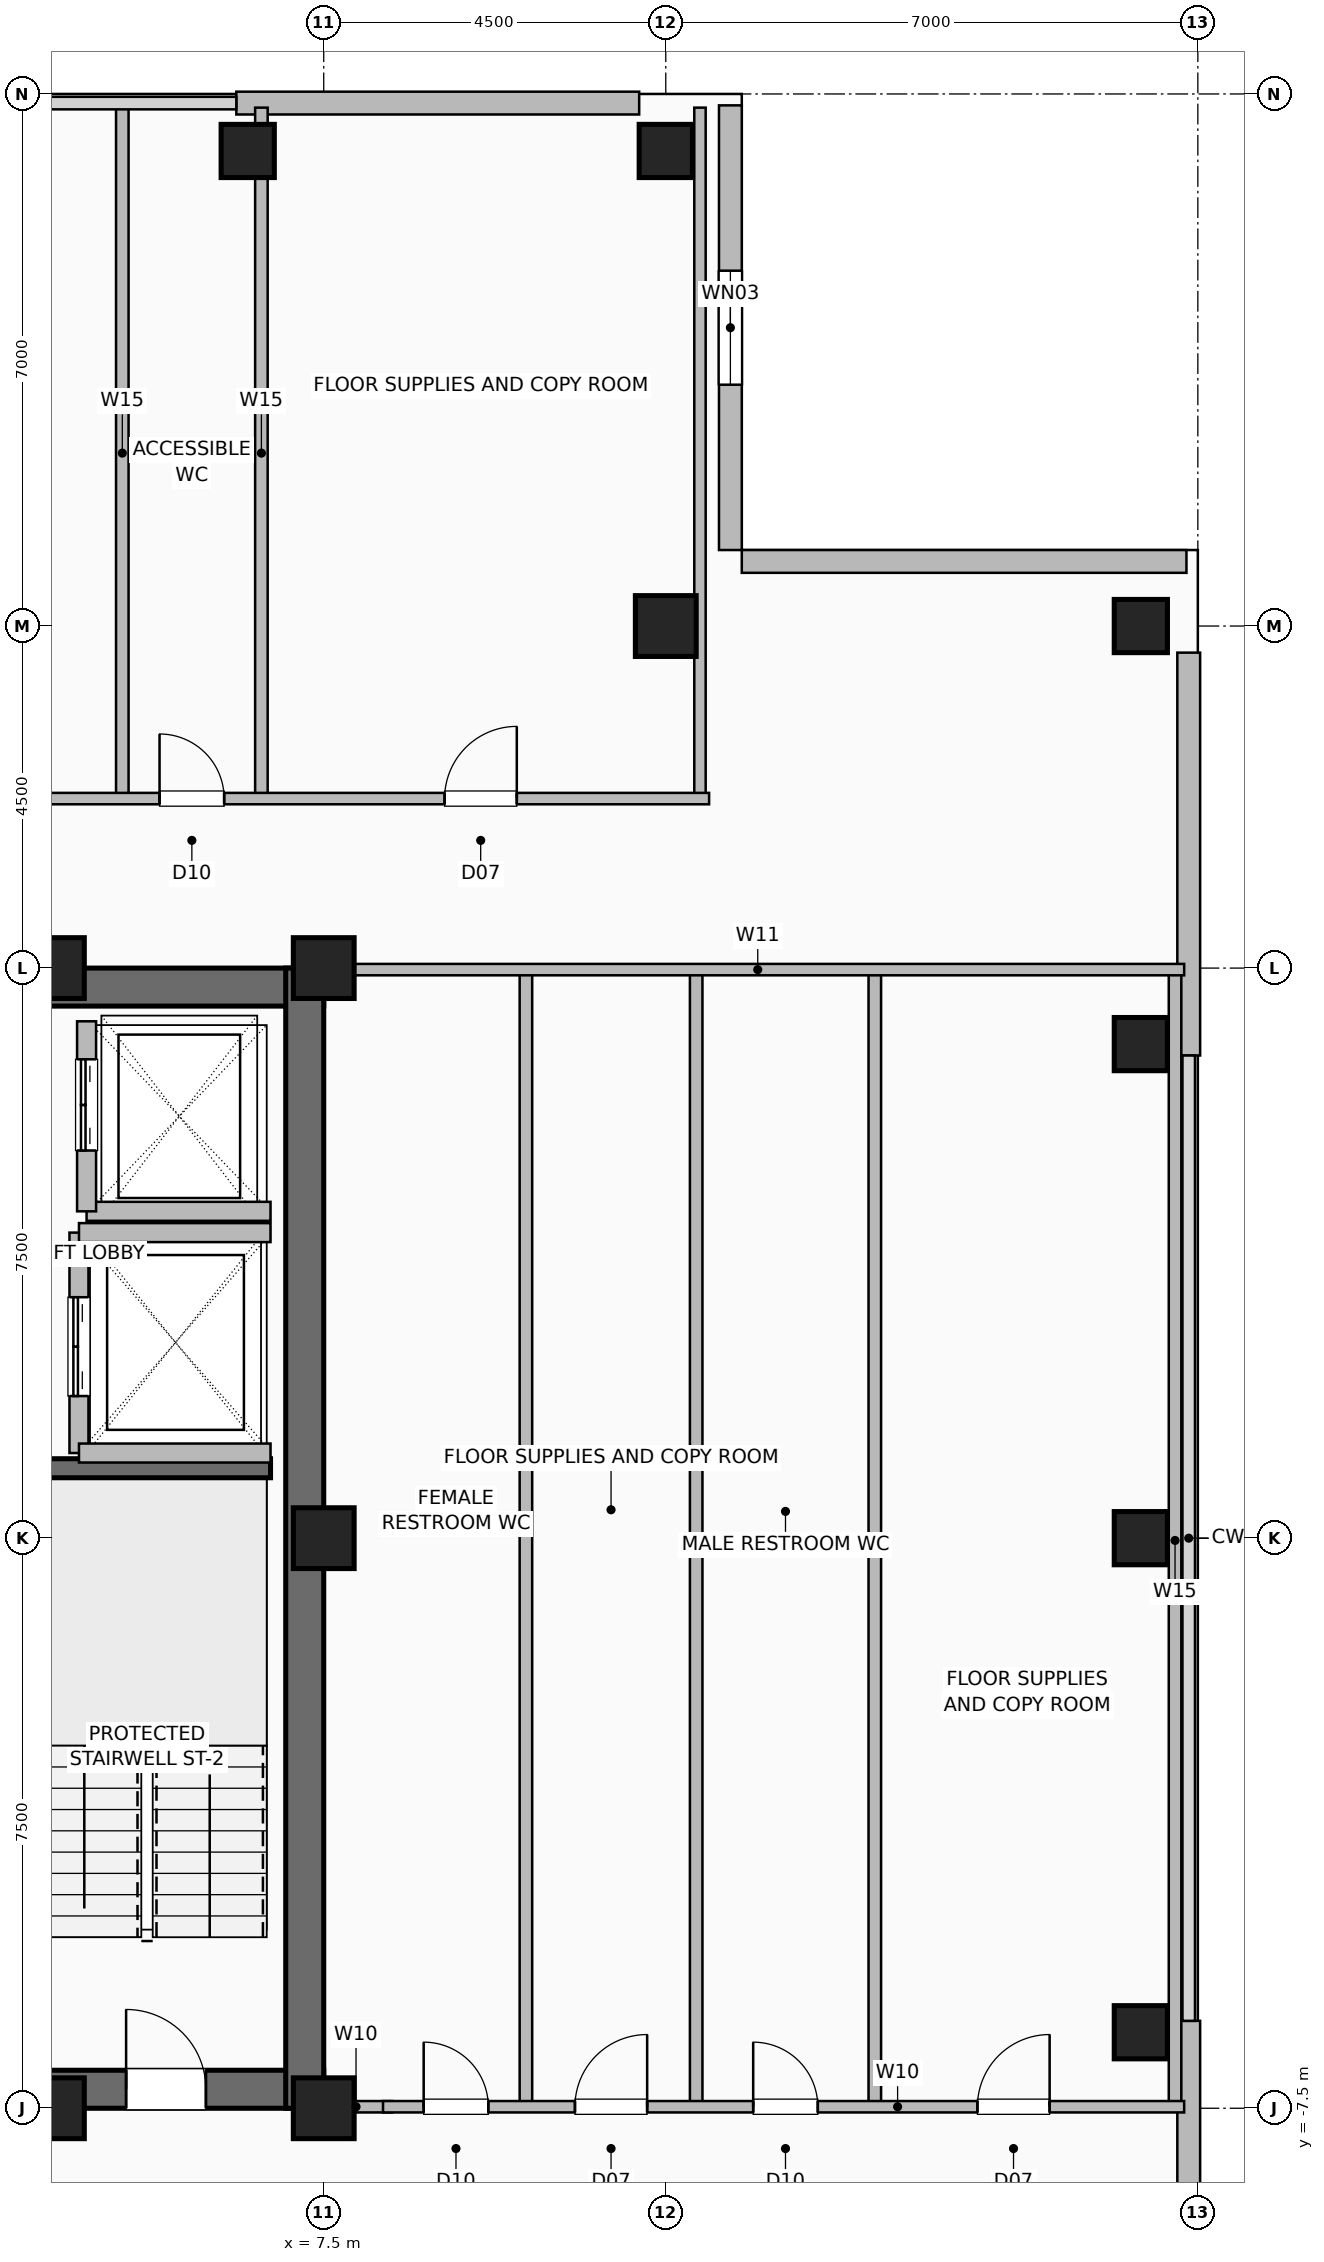
"""IFC4 building model, lengths in metres.
Left out: names, types, materials, properties, quantities, classifications, styles, units other than length and angle.
Written with IfcOpenShell. Run it as: python <this file> out.ifc"""

import sys

from ifc_helpers import new_model, si_unit, direction, frame, frame_2d, origin, origin_2d, place, context, subcontext, project, spatial, rectangle, hollow_rectangle, extrude, element, fill, save


model = new_model("IFC4")
c1 = context("Model", 3, precision=1e-05, world=origin(), true_north=direction((0.0, 1.0)))
c2 = subcontext(c1, "Body", "Model", "MODEL_VIEW")
j1 = project(units=[si_unit("LENGTHUNIT", "METRE"), si_unit("PLANEANGLEUNIT", "RADIAN")], contexts=[c1])
p1 = place(None, origin())
s1 = spatial("IfcSite", under=j1, at=p1, CompositionType="ELEMENT")
p2 = place(p1, origin())
s2 = spatial("IfcBuilding", under=s1, at=p2, CompositionType="ELEMENT")
p3 = place(p2, frame((0.0, 0.0, 257.6)))
s3 = spatial("IfcBuildingStorey", under=s2, at=p3, CompositionType="ELEMENT", Elevation=257.6)
for number, where, z_axis, x_axis in (
    (1, (3.95, -7.5, 0.0), (0.0, 0.0, 1.0), (1.0, 0.0, 0.0)),
    (2, (7.5, -7.5, 0.0), (0.0, 0.0, 1.0), (1.0, 0.0, 0.0)),
    (3, (7.5, 0.0, 0.0), (0.0, 0.0, 1.0), (1.0, 0.0, 0.0)),
    (4, (7.5, 7.5, 0.0), (0.0, 0.0, 1.0), (1.0, 0.0, 0.0)),
    (5, (3.95, 7.5, 0.0), (0.0, 0.0, 1.0), (1.0, 0.0, 0.0)),
):
    element("IfcColumn", number, at=place(p3, frame(where, z_axis=z_axis, x_axis=x_axis)), inside=s3, PredefinedType="COLUMN", context=c2, shape_type="SweptSolid", body=[
        extrude(hollow_rectangle(XDim=0.8, YDim=0.8, WallThickness=0.04, at=origin_2d()), origin(), (0.0, 0.0, 1.0), 3.6),
    ])
for number, where, z_axis, x_axis in (
    (6, (18.25, -6.5, 0.0), (0.0, 0.0, 1.0), (1.0, 0.0, 0.0)),
    (7, (18.25, 0.0, 0.0), (0.0, 0.0, 1.0), (1.0, 0.0, 0.0)),
    (8, (6.5, 18.25, 0.0), (0.0, 0.0, 1.0), (1.0, 0.0, 0.0)),
    (9, (18.25, 6.5, 0.0), (0.0, 0.0, 1.0), (1.0, 0.0, 0.0)),
    (10, (12.0, 18.25, 0.0), (0.0, 0.0, 1.0), (1.0, 0.0, 0.0)),
    (11, (18.25, 12.0, 0.0), (0.0, 0.0, 1.0), (1.0, 0.0, 0.0)),
):
    element("IfcColumn", number, at=place(p3, frame(where, z_axis=z_axis, x_axis=x_axis)), inside=s3, PredefinedType="COLUMN", context=c2, shape_type="SweptSolid", body=[
        extrude(hollow_rectangle(XDim=0.7, YDim=0.7, WallThickness=0.035, at=origin_2d()), origin(), (0.0, 0.0, 1.0), 3.6),
    ])
p4 = place(p3, frame((12.0, 12.0, 0.0), z_axis=(0.0, 0.0, 1.0), x_axis=(1.0, 0.0, 0.0)))
e12 = element("IfcColumn", 12, at=p4, inside=s3, PredefinedType="COLUMN", context=c2, shape_type="SweptSolid", body=[
    extrude(hollow_rectangle(XDim=0.8, YDim=0.8, WallThickness=0.04, at=origin_2d()), origin(), (0.0, 0.0, 1.0), 3.6),
])
for number, where, z_axis, x_axis in (
    (13, (6.35, 18.88, 0.0), (0.0, 0.0, 1.0), (1.0, 0.0, 0.0)),
    (14, (18.88, -11.65, 0.0), (0.0, 0.0, 1.0), (0.0, 1.0, 0.0)),
    (15, (18.88, 6.35, 0.0), (0.0, 0.0, 1.0), (0.0, 1.0, 0.0)),
):
    element("IfcWall", number, at=place(p3, frame(where, z_axis=z_axis, x_axis=x_axis)), inside=s3, PredefinedType="SOLIDWALL", context=c2, shape_type="SweptSolid", body=[
        extrude(rectangle(XDim=5.3, YDim=0.3, at=frame_2d((2.65, 0.0))), origin(), (0.0, 0.0, 1.0), 3.36),
    ])
p5 = place(p3, frame((12.85, 18.85, 0.0), z_axis=(0.0, 0.0, 1.0), x_axis=(0.0, -1.0, 0.0)))
e16 = element("IfcWall", 16, at=p5, inside=s3, PredefinedType="SOLIDWALL", context=c2, shape_type="SweptSolid", body=[
    extrude(rectangle(XDim=5.85, YDim=0.3, at=frame_2d((2.925, 0.0))), origin(), (0.0, 0.0, 1.0), 3.36),
])
p6 = place(p5, frame((2.175, 0.0, 0.9)))
e17 = element("IfcOpeningElement", 17, at=p6, cuts=e16, PredefinedType="OPENING", context=c2, shape_type="SweptSolid", body=[
    extrude(rectangle(XDim=1.5, YDim=1.8, at=frame_2d((0.75, 0.9))), frame((0.0, 0.16, 0.0), z_axis=(0.0, -1.0, 0.0), x_axis=(1.0, 0.0, 0.0)), (0.0, 0.0, 1.0), 0.32),
])
p7 = place(p3, frame((18.85, 12.85, 0.0), z_axis=(0.0, 0.0, 1.0), x_axis=(-1.0, 0.0, 0.0)))
e18 = element("IfcWall", 18, at=p7, inside=s3, PredefinedType="SOLIDWALL", context=c2, shape_type="SweptSolid", body=[
    extrude(rectangle(XDim=5.85, YDim=0.3, at=frame_2d((2.925, 0.0))), origin(), (0.0, 0.0, 1.0), 3.36),
])
p8 = place(p3, frame((-7.5, -7.25, 0.0), z_axis=(0.0, 0.0, 1.0), x_axis=(1.0, 0.0, 0.0)))
e19 = element("IfcWall", 19, at=p8, inside=s3, PredefinedType="SHEAR", context=c2, shape_type="SweptSolid", body=[
    extrude(rectangle(XDim=15.0, YDim=0.5, at=frame_2d((7.5, 0.0))), origin(), (0.0, 0.0, 1.0), 3.36),
])
p9 = place(p8, frame((1.55, 0.0, 0.0)))
e20 = element("IfcOpeningElement", 20, at=p9, cuts=e19, PredefinedType="OPENING", context=c2, shape_type="SweptSolid", body=[
    extrude(rectangle(XDim=1.05, YDim=2.08, at=frame_2d((0.525, 1.04))), frame((0.0, 0.26, 0.0), z_axis=(0.0, -1.0, 0.0), x_axis=(1.0, 0.0, 0.0)), (0.0, 0.0, 1.0), 0.52),
])
p10 = place(p8, frame((12.4, 0.0, 0.0)))
e21 = element("IfcOpeningElement", 21, at=p10, cuts=e19, PredefinedType="OPENING", context=c2, shape_type="SweptSolid", body=[
    extrude(rectangle(XDim=1.05, YDim=2.08, at=frame_2d((0.525, 1.04))), frame((0.0, 0.26, 0.0), z_axis=(0.0, -1.0, 0.0), x_axis=(1.0, 0.0, 0.0)), (0.0, 0.0, 1.0), 0.52),
])
p11 = place(p8, frame((5.2, 0.0, 0.0)))
e22 = element("IfcOpeningElement", 22, at=p11, cuts=e19, PredefinedType="OPENING", context=c2, shape_type="SweptSolid", body=[
    extrude(rectangle(XDim=1.0, YDim=2.08, at=frame_2d((0.5, 1.04))), frame((0.0, 0.26, 0.0), z_axis=(0.0, -1.0, 0.0), x_axis=(1.0, 0.0, 0.0)), (0.0, 0.0, 1.0), 0.52),
])
p12 = place(p8, frame((8.65, 0.0, 0.0)))
e23 = element("IfcOpeningElement", 23, at=p12, cuts=e19, PredefinedType="OPENING", context=c2, shape_type="SweptSolid", body=[
    extrude(rectangle(XDim=1.0, YDim=2.08, at=frame_2d((0.5, 1.04))), frame((0.0, 0.26, 0.0), z_axis=(0.0, -1.0, 0.0), x_axis=(1.0, 0.0, 0.0)), (0.0, 0.0, 1.0), 0.52),
])
for number, where, z_axis, x_axis in (
    (24, (-7.5, 7.25, 0.0), (0.0, 0.0, 1.0), (1.0, 0.0, 0.0)),
    (25, (7.25, -7.5, 0.0), (0.0, 0.0, 1.0), (0.0, 1.0, 0.0)),
):
    element("IfcWall", number, at=place(p3, frame(where, z_axis=z_axis, x_axis=x_axis)), inside=s3, PredefinedType="SHEAR", context=c2, shape_type="SweptSolid", body=[
        extrude(rectangle(XDim=15.0, YDim=0.5, at=frame_2d((7.5, 0.0))), origin(), (0.0, 0.0, 1.0), 3.36),
    ])
p13 = place(p3, frame((3.47, 0.92, 0.0), z_axis=(0.0, 0.0, 1.0), x_axis=(1.0, 0.0, 0.0)))
e26 = element("IfcWall", 26, at=p13, inside=s3, PredefinedType="SHEAR", context=c2, shape_type="SweptSolid", body=[
    extrude(rectangle(XDim=3.33, YDim=0.25, at=frame_2d((1.665, 0.0))), origin(), (0.0, 0.0, 1.0), 3.36),
])
p14 = place(p3, frame((4.38, 4.3, 0.0), z_axis=(0.0, 0.0, 1.0), x_axis=(1.0, 0.0, 0.0)))
e27 = element("IfcWall", 27, at=p14, inside=s3, PredefinedType="SHEAR", context=c2, shape_type="SweptSolid", body=[
    extrude(rectangle(XDim=2.42, YDim=0.25, at=frame_2d((1.21, 0.0))), origin(), (0.0, 0.0, 1.0), 3.36),
])
p15 = place(p3, frame((4.38, 4.3, 0.0), z_axis=(0.0, 0.0, 1.0), x_axis=(0.0, 1.0, 0.0)))
e28 = element("IfcWall", 28, at=p15, inside=s3, PredefinedType="SHEAR", context=c2, shape_type="SweptSolid", body=[
    extrude(rectangle(XDim=2.5, YDim=0.25, at=frame_2d((1.25, 0.0))), origin(), (0.0, 0.0, 1.0), 3.36),
])
p16 = place(p15, frame((0.8, 0.0, 0.0)))
e29 = element("IfcOpeningElement", 29, at=p16, cuts=e28, PredefinedType="OPENING", context=c2, shape_type="SweptSolid", body=[
    extrude(rectangle(XDim=1.2, YDim=2.2, at=frame_2d((0.6, 1.1))), frame((0.0, 0.135, 0.0), z_axis=(0.0, -1.0, 0.0), x_axis=(1.0, 0.0, 0.0)), (0.0, 0.0, 1.0), 0.27),
])
p17 = place(p3, frame((4.28, 1.12, 0.0), z_axis=(0.0, 0.0, 1.0), x_axis=(0.0, 1.0, 0.0)))
e30 = element("IfcWall", 30, at=p17, inside=s3, PredefinedType="SHEAR", context=c2, shape_type="SweptSolid", body=[
    extrude(rectangle(XDim=2.9, YDim=0.25, at=frame_2d((1.45, 0.0))), origin(), (0.0, 0.0, 1.0), 3.36),
])
p18 = place(p17, frame((0.75, 0.0, 0.0)))
e31 = element("IfcOpeningElement", 31, at=p18, cuts=e30, PredefinedType="OPENING", context=c2, shape_type="SweptSolid", body=[
    extrude(rectangle(XDim=1.3, YDim=2.3, at=frame_2d((0.65, 1.15))), frame((0.0, 0.135, 0.0), z_axis=(0.0, -1.0, 0.0), x_axis=(1.0, 0.0, 0.0)), (0.0, 0.0, 1.0), 0.27),
])
for number, where, z_axis, x_axis in (
    (32, (4.28, 1.12, 0.0), (0.0, 0.0, 1.0), (1.0, 0.0, 0.0)),
    (33, (4.28, 4.02, 0.0), (0.0, 0.0, 1.0), (1.0, 0.0, 0.0)),
):
    element("IfcWall", number, at=place(p3, frame(where, z_axis=z_axis, x_axis=x_axis)), inside=s3, PredefinedType="SHEAR", context=c2, shape_type="SweptSolid", body=[
        extrude(rectangle(XDim=2.52, YDim=0.25, at=frame_2d((1.26, 0.0))), origin(), (0.0, 0.0, 1.0), 3.36),
    ])
for number, where, z_axis, x_axis in (
    (34, (6.68, 9.73, 0.0), (0.0, 0.0, 1.0), (0.0, 1.0, 0.0)),
    (35, (4.85, 9.73, 0.0), (0.0, 0.0, 1.0), (0.0, 1.0, 0.0)),
):
    element("IfcWall", number, at=place(p3, frame(where, z_axis=z_axis, x_axis=x_axis)), inside=s3, PredefinedType="PLUMBINGWALL", context=c2, shape_type="SweptSolid", body=[
        extrude(rectangle(XDim=9.09, YDim=0.165, at=frame_2d((4.545, 0.0))), origin(), (0.0, 0.0, 1.0), 3.36),
    ])
p19 = place(p3, frame((12.45, 9.73, 0.0), z_axis=(0.0, 0.0, 1.0), x_axis=(0.0, 1.0, 0.0)))
e36 = element("IfcWall", 36, at=p19, inside=s3, PredefinedType="PARTITIONING", context=c2, shape_type="SweptSolid", body=[
    extrude(rectangle(XDim=9.09, YDim=0.15, at=frame_2d((4.545, 0.0))), origin(), (0.0, 0.0, 1.0), 3.36),
])
p20 = place(p3, frame((-7.52, 9.73, 0.0), z_axis=(0.0, 0.0, 1.0), x_axis=(1.0, 0.0, 0.0)))
e37 = element("IfcWall", 37, at=p20, inside=s3, PredefinedType="PARTITIONING", context=c2, shape_type="SweptSolid", body=[
    extrude(rectangle(XDim=20.09, YDim=0.15, at=frame_2d((10.045, 0.0))), origin(), (0.0, 0.0, 1.0), 3.36),
])
p21 = place(p20, frame((5.345, 0.0, 0.0)))
e38 = element("IfcOpeningElement", 38, at=p21, cuts=e37, PredefinedType="OPENING", context=c2, shape_type="SweptSolid", body=[
    extrude(rectangle(XDim=1.8, YDim=2.08, at=frame_2d((0.9, 1.04))), frame((0.0, 0.085, 0.0), z_axis=(0.0, -1.0, 0.0), x_axis=(1.0, 0.0, 0.0)), (0.0, 0.0, 1.0), 0.17),
])
p22 = place(p20, frame((12.86, 0.0, 0.0)))
e39 = element("IfcOpeningElement", 39, at=p22, cuts=e37, PredefinedType="OPENING", context=c2, shape_type="SweptSolid", body=[
    extrude(rectangle(XDim=0.85, YDim=2.05, at=frame_2d((0.425, 1.025))), frame((0.0, 0.085, 0.0), z_axis=(0.0, -1.0, 0.0), x_axis=(1.0, 0.0, 0.0)), (0.0, 0.0, 1.0), 0.17),
])
p23 = place(p20, frame((16.61, 0.0, 0.0)))
e40 = element("IfcOpeningElement", 40, at=p23, cuts=e37, PredefinedType="OPENING", context=c2, shape_type="SweptSolid", body=[
    extrude(rectangle(XDim=0.95, YDim=2.06, at=frame_2d((0.475, 1.03))), frame((0.0, 0.085, 0.0), z_axis=(0.0, -1.0, 0.0), x_axis=(1.0, 0.0, 0.0)), (0.0, 0.0, 1.0), 0.17),
])
p24 = place(p3, frame((7.45, -7.48, 0.0), z_axis=(0.0, 0.0, 1.0), x_axis=(1.0, 0.0, 0.0)))
e41 = element("IfcWall", 41, at=p24, inside=s3, PredefinedType="PARTITIONING", context=c2, shape_type="SweptSolid", body=[
    extrude(rectangle(XDim=0.95, YDim=0.15, at=frame_2d((0.475, 0.0))), origin(), (0.0, 0.0, 1.0), 3.36),
])
for number, where, z_axis, x_axis in (
    (42, (10.16, -7.48, 0.0), (0.0, 0.0, 1.0), (0.0, 1.0, 0.0)),
    (43, (14.75, -7.48, 0.0), (0.0, 0.0, 1.0), (0.0, 1.0, 0.0)),
    (44, (12.4, -7.48, 0.0), (0.0, 0.0, 1.0), (0.0, 1.0, 0.0)),
    (45, (18.7, -7.48, 0.0), (0.0, 0.0, 1.0), (0.0, 1.0, 0.0)),
):
    element("IfcWall", number, at=place(p3, frame(where, z_axis=z_axis, x_axis=x_axis)), inside=s3, PredefinedType="PLUMBINGWALL", context=c2, shape_type="SweptSolid", body=[
        extrude(rectangle(XDim=14.9, YDim=0.165, at=frame_2d((7.45, 0.0))), origin(), (0.0, 0.0, 1.0), 3.36),
    ])
p25 = place(p3, frame((8.28, -7.48, 0.0), z_axis=(0.0, 0.0, 1.0), x_axis=(1.0, 0.0, 0.0)))
e46 = element("IfcWall", 46, at=p25, inside=s3, PredefinedType="PARTITIONING", context=c2, shape_type="SweptSolid", body=[
    extrude(rectangle(XDim=10.54, YDim=0.15, at=frame_2d((5.27, 0.0))), origin(), (0.0, 0.0, 1.0), 3.36),
])
p26 = place(p25, frame((0.535, 0.0, 0.0)))
e47 = element("IfcOpeningElement", 47, at=p26, cuts=e46, PredefinedType="OPENING", context=c2, shape_type="SweptSolid", body=[
    extrude(rectangle(XDim=0.85, YDim=2.05, at=frame_2d((0.425, 1.025))), frame((0.0, 0.085, 0.0), z_axis=(0.0, -1.0, 0.0), x_axis=(1.0, 0.0, 0.0)), (0.0, 0.0, 1.0), 0.17),
])
p27 = place(p25, frame((2.525, 0.0, 0.0)))
e48 = element("IfcOpeningElement", 48, at=p27, cuts=e46, PredefinedType="OPENING", context=c2, shape_type="SweptSolid", body=[
    extrude(rectangle(XDim=0.95, YDim=2.06, at=frame_2d((0.475, 1.03))), frame((0.0, 0.085, 0.0), z_axis=(0.0, -1.0, 0.0), x_axis=(1.0, 0.0, 0.0)), (0.0, 0.0, 1.0), 0.17),
])
p28 = place(p25, frame((4.87, 0.0, 0.0)))
e49 = element("IfcOpeningElement", 49, at=p28, cuts=e46, PredefinedType="OPENING", context=c2, shape_type="SweptSolid", body=[
    extrude(rectangle(XDim=0.85, YDim=2.05, at=frame_2d((0.425, 1.025))), frame((0.0, 0.085, 0.0), z_axis=(0.0, -1.0, 0.0), x_axis=(1.0, 0.0, 0.0)), (0.0, 0.0, 1.0), 0.17),
])
p29 = place(p25, frame((7.82, 0.0, 0.0)))
e50 = element("IfcOpeningElement", 50, at=p29, cuts=e46, PredefinedType="OPENING", context=c2, shape_type="SweptSolid", body=[
    extrude(rectangle(XDim=0.95, YDim=2.06, at=frame_2d((0.475, 1.03))), frame((0.0, 0.085, 0.0), z_axis=(0.0, -1.0, 0.0), x_axis=(1.0, 0.0, 0.0)), (0.0, 0.0, 1.0), 0.17),
])
p30 = place(p3, frame((7.6, 7.48, 0.0), z_axis=(0.0, 0.0, 1.0), x_axis=(1.0, 0.0, 0.0)))
e51 = element("IfcWall", 51, at=p30, inside=s3, PredefinedType="PARTITIONING", context=c2, shape_type="SweptSolid", body=[
    extrude(rectangle(XDim=11.22, YDim=0.15, at=frame_2d((5.61, 0.0))), origin(), (0.0, 0.0, 1.0), 3.36),
])
p31 = place(p6, origin())
e52 = element("IfcWindow", 52, at=p31, inside=s3, PartitioningType="SINGLE_PANEL", PredefinedType="WINDOW", context=c2, shape_type="SweptSolid", body=[
    extrude(rectangle(XDim=1.5, YDim=1.8, at=frame_2d((0.75, 0.9))), frame((0.0, 0.03, 0.0), z_axis=(0.0, -1.0, 0.0), x_axis=(1.0, 0.0, 0.0)), (0.0, 0.0, 1.0), 0.06),
])
fill(e17, e52)
p32 = place(p10, origin())
e53 = element("IfcDoor", 53, at=p32, inside=s3, OperationType="SINGLE_SWING_LEFT", PredefinedType="DOOR", context=c2, shape_type="SweptSolid", body=[
    extrude(rectangle(XDim=1.05, YDim=2.08, at=frame_2d((0.525, 1.04))), frame((0.0, 0.025, 0.0), z_axis=(0.0, -1.0, 0.0), x_axis=(1.0, 0.0, 0.0)), (0.0, 0.0, 1.0), 0.05),
])
fill(e21, e53)
p33 = place(p16, origin())
e54 = element("IfcDoor", 54, at=p33, inside=s3, OperationType="DOUBLE_DOOR_SLIDING", PredefinedType="DOOR", context=c2, shape_type="SweptSolid", body=[
    extrude(rectangle(XDim=1.2, YDim=2.2, at=frame_2d((0.6, 1.1))), frame((0.0, 0.025, 0.0), z_axis=(0.0, -1.0, 0.0), x_axis=(1.0, 0.0, 0.0)), (0.0, 0.0, 1.0), 0.05),
])
fill(e29, e54)
p34 = place(p18, origin())
e55 = element("IfcDoor", 55, at=p34, inside=s3, OperationType="DOUBLE_DOOR_SLIDING", PredefinedType="DOOR", context=c2, shape_type="SweptSolid", body=[
    extrude(rectangle(XDim=1.3, YDim=2.3, at=frame_2d((0.65, 1.15))), frame((0.0, 0.025, 0.0), z_axis=(0.0, -1.0, 0.0), x_axis=(1.0, 0.0, 0.0)), (0.0, 0.0, 1.0), 0.05),
])
fill(e31, e55)
p35 = place(p22, origin())
e56 = element("IfcDoor", 56, at=p35, inside=s3, OperationType="SINGLE_SWING_LEFT", PredefinedType="DOOR", context=c2, shape_type="SweptSolid", body=[
    extrude(rectangle(XDim=0.85, YDim=2.05, at=frame_2d((0.425, 1.025))), frame((0.0, 0.025, 0.0), z_axis=(0.0, -1.0, 0.0), x_axis=(1.0, 0.0, 0.0)), (0.0, 0.0, 1.0), 0.05),
])
fill(e39, e56)
p36 = place(p23, origin())
e57 = element("IfcDoor", 57, at=p36, inside=s3, OperationType="SINGLE_SWING_RIGHT", PredefinedType="DOOR", context=c2, shape_type="SweptSolid", body=[
    extrude(rectangle(XDim=0.95, YDim=2.06, at=frame_2d((0.475, 1.03))), frame((0.0, 0.025, 0.0), z_axis=(0.0, -1.0, 0.0), x_axis=(1.0, 0.0, 0.0)), (0.0, 0.0, 1.0), 0.05),
])
fill(e40, e57)
p37 = place(p26, origin())
e58 = element("IfcDoor", 58, at=p37, inside=s3, OperationType="SINGLE_SWING_LEFT", PredefinedType="DOOR", context=c2, shape_type="SweptSolid", body=[
    extrude(rectangle(XDim=0.85, YDim=2.05, at=frame_2d((0.425, 1.025))), frame((0.0, 0.025, 0.0), z_axis=(0.0, -1.0, 0.0), x_axis=(1.0, 0.0, 0.0)), (0.0, 0.0, 1.0), 0.05),
])
fill(e47, e58)
p38 = place(p27, origin())
e59 = element("IfcDoor", 59, at=p38, inside=s3, OperationType="SINGLE_SWING_RIGHT", PredefinedType="DOOR", context=c2, shape_type="SweptSolid", body=[
    extrude(rectangle(XDim=0.95, YDim=2.06, at=frame_2d((0.475, 1.03))), frame((0.0, 0.025, 0.0), z_axis=(0.0, -1.0, 0.0), x_axis=(1.0, 0.0, 0.0)), (0.0, 0.0, 1.0), 0.05),
])
fill(e48, e59)
p39 = place(p28, origin())
e60 = element("IfcDoor", 60, at=p39, inside=s3, OperationType="SINGLE_SWING_LEFT", PredefinedType="DOOR", context=c2, shape_type="SweptSolid", body=[
    extrude(rectangle(XDim=0.85, YDim=2.05, at=frame_2d((0.425, 1.025))), frame((0.0, 0.025, 0.0), z_axis=(0.0, -1.0, 0.0), x_axis=(1.0, 0.0, 0.0)), (0.0, 0.0, 1.0), 0.05),
])
fill(e49, e60)
p40 = place(p29, origin())
e61 = element("IfcDoor", 61, at=p40, inside=s3, OperationType="SINGLE_SWING_RIGHT", PredefinedType="DOOR", context=c2, shape_type="SweptSolid", body=[
    extrude(rectangle(XDim=0.95, YDim=2.06, at=frame_2d((0.475, 1.03))), frame((0.0, 0.025, 0.0), z_axis=(0.0, -1.0, 0.0), x_axis=(1.0, 0.0, 0.0)), (0.0, 0.0, 1.0), 0.05),
])
fill(e50, e61)
save(model, sys.argv[1])
